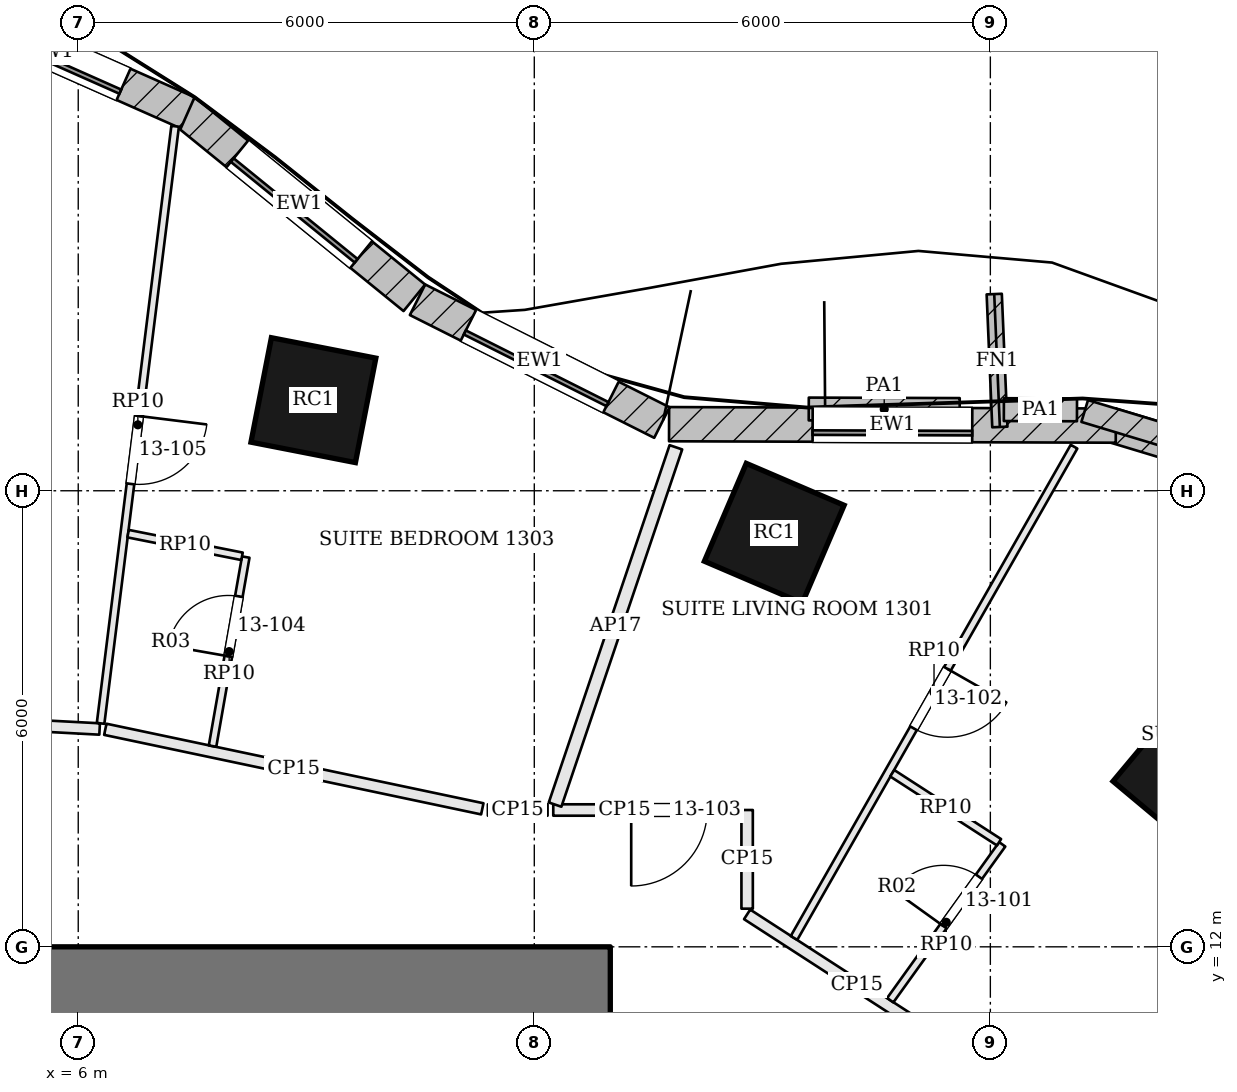
"""IFC4 building model, lengths in metres.
Left out: names, types, materials, properties, quantities, classifications, styles, units other than length and angle.
Written with IfcOpenShell. Run it as: python <this file> out.ifc"""

import sys

from ifc_helpers import new_model, si_unit, direction, frame, frame_2d, origin, origin_2d, place, context, subcontext, project, spatial, rectangle, extrude, element, fill, save


model = new_model("IFC4")
c1 = context("Model", 3, precision=1e-05, world=origin(), true_north=direction((0.0, 1.0)))
c2 = subcontext(c1, "Body", "Model", "MODEL_VIEW")
j1 = project(units=[si_unit("LENGTHUNIT", "METRE"), si_unit("PLANEANGLEUNIT", "RADIAN")], contexts=[c1])
p1 = place(None, origin())
s1 = spatial("IfcSite", under=j1, at=p1, CompositionType="ELEMENT")
p2 = place(p1, origin())
s2 = spatial("IfcBuilding", under=s1, at=p2, CompositionType="ELEMENT")
p3 = place(p2, frame((0.0, 0.0, 62.7)))
s3 = spatial("IfcBuildingStorey", under=s2, at=p3, CompositionType="ELEMENT", Elevation=62.7)
p4 = place(p3, frame((-13.0, 11.3, 0.0), z_axis=(0.0, 0.0, 1.0), x_axis=(1.0, 0.0, 0.0)))
e1 = element("IfcWall", 1, at=p4, inside=s3, PredefinedType="SHEAR", context=c2, shape_type="SweptSolid", body=[
    extrude(rectangle(XDim=26.0, YDim=1.4, at=frame_2d((13.0, 0.0))), origin(), (0.0, 0.0, 1.0), 3.6),
])
p5 = place(p4, frame((9.225, 0.0, 0.0)))
e2 = element("IfcOpeningElement", 2, at=p5, cuts=e1, PredefinedType="OPENING", context=c2, shape_type="SweptSolid", body=[
    extrude(rectangle(XDim=1.0, YDim=2.1, at=frame_2d((0.5, 1.05))), frame((0.0, 0.71, 0.0), z_axis=(0.0, -1.0, 0.0), x_axis=(1.0, 0.0, 0.0)), (0.0, 0.0, 1.0), 1.42),
])
p6 = place(p4, frame((12.225, 0.0, 0.0)))
e3 = element("IfcOpeningElement", 3, at=p6, cuts=e1, PredefinedType="OPENING", context=c2, shape_type="SweptSolid", body=[
    extrude(rectangle(XDim=0.7, YDim=2.1, at=frame_2d((0.35, 1.05))), frame((0.0, 0.71, 0.0), z_axis=(0.0, -1.0, 0.0), x_axis=(1.0, 0.0, 0.0)), (0.0, 0.0, 1.0), 1.42),
])
p7 = place(p4, frame((14.125, 0.0, 0.0)))
e4 = element("IfcOpeningElement", 4, at=p7, cuts=e1, PredefinedType="OPENING", context=c2, shape_type="SweptSolid", body=[
    extrude(rectangle(XDim=1.0, YDim=2.1, at=frame_2d((0.5, 1.05))), frame((0.0, 0.71, 0.0), z_axis=(0.0, -1.0, 0.0), x_axis=(1.0, 0.0, 0.0)), (0.0, 0.0, 1.0), 1.42),
])
p8 = place(p4, frame((15.65, 0.0, 0.0)))
e5 = element("IfcOpeningElement", 5, at=p8, cuts=e1, PredefinedType="OPENING", context=c2, shape_type="SweptSolid", body=[
    extrude(rectangle(XDim=1.0, YDim=2.1, at=frame_2d((0.5, 1.05))), frame((0.0, 0.71, 0.0), z_axis=(0.0, -1.0, 0.0), x_axis=(1.0, 0.0, 0.0)), (0.0, 0.0, 1.0), 1.42),
])
for number, where, z_axis, x_axis in (
    (6, (20.6, 14.266, 0.0), (0.0, 0.0, 1.0), (-0.767, 0.641, 0.0)),
    (7, (15.157, 17.441, 0.0), (0.0, 0.0, 1.0), (-0.919, 0.394, 0.0)),
    (8, (9.094, 19.192, 0.0), (0.0, 0.0, 1.0), (-0.981, 0.192, 0.0)),
):
    element("IfcColumn", number, at=place(p3, frame(where, z_axis=z_axis, x_axis=x_axis)), inside=s3, PredefinedType="COLUMN", context=c2, shape_type="SweptSolid", body=[
        extrude(rectangle(XDim=1.4, YDim=1.4, at=origin_2d()), origin(), (0.0, 0.0, 1.0), 3.6),
    ])
p9 = place(p3, frame((24.257, 17.456, 0.0), z_axis=(0.0, 0.0, 1.0), x_axis=(-0.957268138294, 0.289201852359, 0.0)))
e9 = element("IfcWall", 9, at=p9, inside=s3, PredefinedType="SOLIDWALL", context=c2, shape_type="SweptSolid", body=[
    extrude(rectangle(XDim=4.879, YDim=0.45, at=frame_2d((2.44, 0.0))), origin(), (0.0, 0.0, 1.0), 3.4),
])
p10 = place(p9, frame((1.39, 0.0, 0.9)))
e10 = element("IfcOpeningElement", 10, at=p10, cuts=e9, PredefinedType="OPENING", context=c2, shape_type="SweptSolid", body=[
    extrude(rectangle(XDim=2.1, YDim=2.0, at=frame_2d((1.05, 1.0))), frame((0.0, 0.235, 0.0), z_axis=(0.0, -1.0, 0.0), x_axis=(1.0, 0.0, 0.0)), (0.0, 0.0, 1.0), 0.47),
])
p11 = place(p3, frame((19.65, 18.857, 0.0), z_axis=(0.0, 0.0, 1.0), x_axis=(-0.999994750773, 0.003240127552, 0.0)))
e11 = element("IfcWall", 11, at=p11, inside=s3, PredefinedType="SOLIDWALL", context=c2, shape_type="SweptSolid", body=[
    extrude(rectangle(XDim=5.877, YDim=0.45, at=frame_2d((2.938, 0.0))), origin(), (0.0, 0.0, 1.0), 3.4),
])
p12 = place(p11, frame((1.889, 0.0, 0.9)))
e12 = element("IfcOpeningElement", 12, at=p12, cuts=e11, PredefinedType="OPENING", context=c2, shape_type="SweptSolid", body=[
    extrude(rectangle(XDim=2.1, YDim=2.0, at=frame_2d((1.05, 1.0))), frame((0.0, 0.235, 0.0), z_axis=(0.0, -1.0, 0.0), x_axis=(1.0, 0.0, 0.0)), (0.0, 0.0, 1.0), 0.47),
])
p13 = place(p3, frame((13.679, 18.897, 0.0), z_axis=(0.0, 0.0, 1.0), x_axis=(-0.893502471356, 0.449058274259, 0.0)))
e13 = element("IfcWall", 13, at=p13, inside=s3, PredefinedType="SOLIDWALL", context=c2, shape_type="SweptSolid", body=[
    extrude(rectangle(XDim=3.598, YDim=0.45, at=frame_2d((1.799, 0.0))), origin(), (0.0, 0.0, 1.0), 3.4),
])
p14 = place(p13, frame((0.749, 0.0, 0.9)))
e14 = element("IfcOpeningElement", 14, at=p14, cuts=e13, PredefinedType="OPENING", context=c2, shape_type="SweptSolid", body=[
    extrude(rectangle(XDim=2.1, YDim=2.0, at=frame_2d((1.05, 1.0))), frame((0.0, 0.235, 0.0), z_axis=(0.0, -1.0, 0.0), x_axis=(1.0, 0.0, 0.0)), (0.0, 0.0, 1.0), 0.47),
])
p15 = place(p3, frame((10.422, 20.539, 0.0), z_axis=(0.0, 0.0, 1.0), x_axis=(-0.775999170522, 0.63073392754, 0.0)))
e15 = element("IfcWall", 15, at=p15, inside=s3, PredefinedType="SOLIDWALL", context=c2, shape_type="SweptSolid", body=[
    extrude(rectangle(XDim=3.903, YDim=0.45, at=frame_2d((1.951, 0.0))), origin(), (0.0, 0.0, 1.0), 3.4),
])
p16 = place(p15, frame((0.901, 0.0, 0.9)))
e16 = element("IfcOpeningElement", 16, at=p16, cuts=e15, PredefinedType="OPENING", context=c2, shape_type="SweptSolid", body=[
    extrude(rectangle(XDim=2.1, YDim=2.0, at=frame_2d((1.05, 1.0))), frame((0.0, 0.235, 0.0), z_axis=(0.0, -1.0, 0.0), x_axis=(1.0, 0.0, 0.0)), (0.0, 0.0, 1.0), 0.47),
])
p17 = place(p3, frame((7.44, 22.972, 0.0), z_axis=(0.0, 0.0, 1.0), x_axis=(-0.914114918534, 0.405455195692, 0.0)))
e17 = element("IfcWall", 17, at=p17, inside=s3, PredefinedType="SOLIDWALL", context=c2, shape_type="SweptSolid", body=[
    extrude(rectangle(XDim=3.946, YDim=0.45, at=frame_2d((1.973, 0.0))), origin(), (0.0, 0.0, 1.0), 3.4),
])
p18 = place(p17, frame((0.923, 0.0, 0.9)))
e18 = element("IfcOpeningElement", 18, at=p18, cuts=e17, PredefinedType="OPENING", context=c2, shape_type="SweptSolid", body=[
    extrude(rectangle(XDim=2.1, YDim=2.0, at=frame_2d((1.05, 1.0))), frame((0.0, 0.235, 0.0), z_axis=(0.0, -1.0, 0.0), x_axis=(1.0, 0.0, 0.0)), (0.0, 0.0, 1.0), 0.47),
])
p19 = place(p3, frame((18.125, 18.839, 0.0), z_axis=(0.0, 0.0, 1.0), x_axis=(-0.042274699855, 0.999106025281, 0.0)))
e19 = element("IfcWall", 19, at=p19, inside=s3, PredefinedType="SOLIDWALL", context=c2, shape_type="SweptSolid", body=[
    extrude(rectangle(XDim=1.75, YDim=0.2, at=frame_2d((0.875, 0.0))), origin(), (0.0, 0.0, 1.0), 3.4),
])
p20 = place(p3, frame((24.128, 17.573, 3.6), z_axis=(0.0, 0.0, 1.0), x_axis=(-0.95727702005, 0.289172451806, 0.0)))
e20 = element("IfcWall", 20, at=p20, inside=s3, PredefinedType="PARAPET", context=c2, shape_type="SweptSolid", body=[
    extrude(rectangle(XDim=5.105, YDim=0.3, at=frame_2d((2.553, 0.0))), origin(), (0.0, 0.0, 1.0), 1.1),
])
p21 = place(p3, frame((19.14, 19.064, 3.6), z_axis=(0.0, 0.0, 1.0), x_axis=(-0.999994556719, 0.003299474426, 0.0)))
e21 = element("IfcWall", 21, at=p21, inside=s3, PredefinedType="PARAPET", context=c2, shape_type="SweptSolid", body=[
    extrude(rectangle(XDim=0.962, YDim=0.3, at=frame_2d((0.481, 0.0))), origin(), (0.0, 0.0, 1.0), 1.1),
])
p22 = place(p3, frame((17.596, 19.069, 3.6), z_axis=(0.0, 0.0, 1.0), x_axis=(-0.999994488127, 0.003320198128, 0.0)))
e22 = element("IfcWall", 22, at=p22, inside=s3, PredefinedType="PARAPET", context=c2, shape_type="SweptSolid", body=[
    extrude(rectangle(XDim=1.985, YDim=0.3, at=frame_2d((0.993, 0.0))), origin(), (0.0, 0.0, 1.0), 1.1),
])
p23 = place(p3, frame((17.691, 10.556, 0.0), z_axis=(0.0, 0.0, 1.0), x_axis=(-0.839564450265, 0.54326009779, 0.0)))
e23 = element("IfcWall", 23, at=p23, inside=s3, PredefinedType="PARTITIONING", context=c2, shape_type="SweptSolid", body=[
    extrude(rectangle(XDim=3.443, YDim=0.15, at=frame_2d((1.722, 0.0))), origin(), (0.0, 0.0, 1.0), 2.68),
])
p24 = place(p3, frame((14.8, 12.502, 0.0), z_axis=(0.0, 0.0, 1.0), x_axis=(-0.000188040613, 0.99999998232, 0.0)))
e24 = element("IfcWall", 24, at=p24, inside=s3, PredefinedType="PARTITIONING", context=c2, shape_type="SweptSolid", body=[
    extrude(rectangle(XDim=1.298, YDim=0.15, at=frame_2d((0.649, 0.0))), origin(), (0.0, 0.0, 1.0), 2.68),
])
p25 = place(p3, frame((14.725, 13.8, 0.0), z_axis=(0.0, 0.0, 1.0), x_axis=(-1.0, 0.0, 0.0)))
e25 = element("IfcWall", 25, at=p25, inside=s3, PredefinedType="PARTITIONING", context=c2, shape_type="SweptSolid", body=[
    extrude(rectangle(XDim=2.476, YDim=0.15, at=frame_2d((1.238, 0.0))), origin(), (0.0, 0.0, 1.0), 2.68),
])
p26 = place(p25, frame((0.45, 0.0, 0.0)))
e26 = element("IfcOpeningElement", 26, at=p26, cuts=e25, PredefinedType="OPENING", context=c2, shape_type="SweptSolid", body=[
    extrude(rectangle(XDim=1.0, YDim=2.1, at=frame_2d((0.5, 1.05))), frame((0.0, 0.085, 0.0), z_axis=(0.0, -1.0, 0.0), x_axis=(1.0, 0.0, 0.0)), (0.0, 0.0, 1.0), 0.17),
])
p27 = place(p3, frame((26.021, 13.398, 0.0), z_axis=(0.0, 0.0, 1.0), x_axis=(-0.791914254245, -0.610632306649, 0.0)))
e27 = element("IfcWall", 27, at=p27, inside=s3, PredefinedType="PARTITIONING", context=c2, shape_type="SweptSolid", body=[
    extrude(rectangle(XDim=7.922, YDim=0.175, at=frame_2d((3.961, 0.0))), origin(), (0.0, 0.0, 1.0), 2.68),
])
p28 = place(p3, frame((13.863, 18.572, 0.0), z_axis=(0.0, 0.0, 1.0), x_axis=(-0.320254541028, -0.947331530643, 0.0)))
e28 = element("IfcWall", 28, at=p28, inside=s3, PredefinedType="PARTITIONING", context=c2, shape_type="SweptSolid", body=[
    extrude(rectangle(XDim=4.962, YDim=0.175, at=frame_2d((2.481, 0.0))), origin(), (0.0, 0.0, 1.0), 2.68),
])
p29 = place(p3, frame((12.175, 13.8, 0.0), z_axis=(0.0, 0.0, 1.0), x_axis=(-1.0, 0.0, 0.0)))
e29 = element("IfcWall", 29, at=p29, inside=s3, PredefinedType="PARTITIONING", context=c2, shape_type="SweptSolid", body=[
    extrude(rectangle(XDim=0.785, YDim=0.15, at=frame_2d((0.393, 0.0))), origin(), (0.0, 0.0, 1.0), 2.68),
])
p30 = place(p3, frame((11.316, 13.815, 0.0), z_axis=(0.0, 0.0, 1.0), x_axis=(-0.978460774853, 0.206432827025, 0.0)))
e30 = element("IfcWall", 30, at=p30, inside=s3, PredefinedType="PARTITIONING", context=c2, shape_type="SweptSolid", body=[
    extrude(rectangle(XDim=5.069, YDim=0.15, at=frame_2d((2.534, 0.0))), origin(), (0.0, 0.0, 1.0), 2.68),
])
p31 = place(p3, frame((6.281, 14.866, 0.0), z_axis=(0.0, 0.0, 1.0), x_axis=(-0.998587832803, 0.053125701673, 0.0)))
e31 = element("IfcWall", 31, at=p31, inside=s3, PredefinedType="PARTITIONING", context=c2, shape_type="SweptSolid", body=[
    extrude(rectangle(XDim=6.126, YDim=0.15, at=frame_2d((3.063, 0.0))), origin(), (0.0, 0.0, 1.0), 2.68),
])
p32 = place(p31, frame((2.561, 0.0, 0.0)))
e32 = element("IfcOpeningElement", 32, at=p32, cuts=e31, PredefinedType="OPENING", context=c2, shape_type="SweptSolid", body=[
    extrude(rectangle(XDim=1.0, YDim=2.1, at=frame_2d((0.5, 1.05))), frame((0.0, 0.085, 0.0), z_axis=(0.0, -1.0, 0.0), x_axis=(1.0, 0.0, 0.0)), (0.0, 0.0, 1.0), 0.17),
])
p33 = place(p3, frame((19.101, 18.58, 0.0), z_axis=(0.0, 0.0, 1.0), x_axis=(-0.49517728181, -0.868791954141, 0.0)))
e33 = element("IfcWall", 33, at=p33, inside=s3, PredefinedType="PARTITIONING", context=c2, shape_type="SweptSolid", body=[
    extrude(rectangle(XDim=7.439, YDim=0.1, at=frame_2d((3.719, 0.0))), origin(), (0.0, 0.0, 1.0), 2.68),
])
p34 = place(p33, frame((3.364, 0.0, 0.0)))
e34 = element("IfcOpeningElement", 34, at=p34, cuts=e33, PredefinedType="OPENING", context=c2, shape_type="SweptSolid", body=[
    extrude(rectangle(XDim=0.9, YDim=2.4, at=frame_2d((0.45, 1.2))), frame((0.0, 0.06, 0.0), z_axis=(0.0, -1.0, 0.0), x_axis=(1.0, 0.0, 0.0)), (0.0, 0.0, 1.0), 0.12),
])
p35 = place(p3, frame((16.683, 11.298, 0.0), z_axis=(0.0, 0.0, 1.0), x_axis=(0.583412891342, 0.812175718805, 0.0)))
e35 = element("IfcWall", 35, at=p35, inside=s3, PredefinedType="PARTITIONING", context=c2, shape_type="SweptSolid", body=[
    extrude(rectangle(XDim=2.525, YDim=0.1, at=frame_2d((1.263, 0.0))), origin(), (0.0, 0.0, 1.0), 2.68),
])
p36 = place(p35, frame((1.2, 0.0, 0.0)))
e36 = element("IfcOpeningElement", 36, at=p36, cuts=e35, PredefinedType="OPENING", context=c2, shape_type="SweptSolid", body=[
    extrude(rectangle(XDim=0.8, YDim=2.1, at=frame_2d((0.4, 1.05))), frame((0.0, 0.06, 0.0), z_axis=(0.0, -1.0, 0.0), x_axis=(1.0, 0.0, 0.0)), (0.0, 0.0, 1.0), 0.12),
])
p37 = place(p3, frame((18.114, 13.375, 0.0), z_axis=(0.0, 0.0, 1.0), x_axis=(-0.839848081289, 0.542821517955, 0.0)))
e37 = element("IfcWall", 37, at=p37, inside=s3, PredefinedType="PARTITIONING", context=c2, shape_type="SweptSolid", body=[
    extrude(rectangle(XDim=1.673, YDim=0.1, at=frame_2d((0.836, 0.0))), origin(), (0.0, 0.0, 1.0), 2.68),
])
p38 = place(p3, frame((7.275, 22.795, 0.0), z_axis=(0.0, 0.0, 1.0), x_axis=(-0.123890489741, -0.992295896672, 0.0)))
e38 = element("IfcWall", 38, at=p38, inside=s3, PredefinedType="PARTITIONING", context=c2, shape_type="SweptSolid", body=[
    extrude(rectangle(XDim=7.916, YDim=0.1, at=frame_2d((3.958, 0.0))), origin(), (0.0, 0.0, 1.0), 2.68),
])
p39 = place(p38, frame((3.841, 0.0, 0.0)))
e39 = element("IfcOpeningElement", 39, at=p39, cuts=e38, PredefinedType="OPENING", context=c2, shape_type="SweptSolid", body=[
    extrude(rectangle(XDim=0.9, YDim=2.4, at=frame_2d((0.45, 1.2))), frame((0.0, 0.06, 0.0), z_axis=(0.0, -1.0, 0.0), x_axis=(1.0, 0.0, 0.0)), (0.0, 0.0, 1.0), 0.12),
])
p40 = place(p3, frame((7.767, 14.641, 0.0), z_axis=(0.0, 0.0, 1.0), x_axis=(0.172985442563, 0.984924381189, 0.0)))
e40 = element("IfcWall", 40, at=p40, inside=s3, PredefinedType="PARTITIONING", context=c2, shape_type="SweptSolid", body=[
    extrude(rectangle(XDim=2.525, YDim=0.1, at=frame_2d((1.262, 0.0))), origin(), (0.0, 0.0, 1.0), 2.68),
])
p41 = place(p40, frame((1.2, 0.0, 0.0)))
e41 = element("IfcOpeningElement", 41, at=p41, cuts=e40, PredefinedType="OPENING", context=c2, shape_type="SweptSolid", body=[
    extrude(rectangle(XDim=0.8, YDim=2.1, at=frame_2d((0.4, 1.05))), frame((0.0, 0.06, 0.0), z_axis=(0.0, -1.0, 0.0), x_axis=(1.0, 0.0, 0.0)), (0.0, 0.0, 1.0), 0.12),
])
p42 = place(p3, frame((8.155, 17.137, 0.0), z_axis=(0.0, 0.0, 1.0), x_axis=(-0.980758463285, 0.195225092382, 0.0)))
e42 = element("IfcWall", 42, at=p42, inside=s3, PredefinedType="PARTITIONING", context=c2, shape_type="SweptSolid", body=[
    extrude(rectangle(XDim=1.528, YDim=0.1, at=frame_2d((0.764, 0.0))), origin(), (0.0, 0.0, 1.0), 2.68),
])
p43 = place(p12, origin())
e43 = element("IfcWindow", 43, at=p43, inside=s3, PartitioningType="SINGLE_PANEL", PredefinedType="WINDOW", context=c2, shape_type="SweptSolid", body=[
    extrude(rectangle(XDim=2.1, YDim=2.0, at=frame_2d((1.05, 1.0))), frame((0.0, 0.135, 0.0), z_axis=(0.0, -1.0, 0.0), x_axis=(1.0, 0.0, 0.0)), (0.0, 0.0, 1.0), 0.06),
])
fill(e12, e43)
p44 = place(p14, origin())
e44 = element("IfcWindow", 44, at=p44, inside=s3, PartitioningType="SINGLE_PANEL", PredefinedType="WINDOW", context=c2, shape_type="SweptSolid", body=[
    extrude(rectangle(XDim=2.1, YDim=2.0, at=frame_2d((1.05, 1.0))), frame((0.0, 0.135, 0.0), z_axis=(0.0, -1.0, 0.0), x_axis=(1.0, 0.0, 0.0)), (0.0, 0.0, 1.0), 0.06),
])
fill(e14, e44)
p45 = place(p16, origin())
e45 = element("IfcWindow", 45, at=p45, inside=s3, PartitioningType="SINGLE_PANEL", PredefinedType="WINDOW", context=c2, shape_type="SweptSolid", body=[
    extrude(rectangle(XDim=2.1, YDim=2.0, at=frame_2d((1.05, 1.0))), frame((0.0, 0.135, 0.0), z_axis=(0.0, -1.0, 0.0), x_axis=(1.0, 0.0, 0.0)), (0.0, 0.0, 1.0), 0.06),
])
fill(e16, e45)
p46 = place(p18, origin())
e46 = element("IfcWindow", 46, at=p46, inside=s3, PartitioningType="SINGLE_PANEL", PredefinedType="WINDOW", context=c2, shape_type="SweptSolid", body=[
    extrude(rectangle(XDim=2.1, YDim=2.0, at=frame_2d((1.05, 1.0))), frame((0.0, 0.135, 0.0), z_axis=(0.0, -1.0, 0.0), x_axis=(1.0, 0.0, 0.0)), (0.0, 0.0, 1.0), 0.06),
])
fill(e18, e46)
p47 = place(p36, origin())
e47 = element("IfcDoor", 47, at=p47, inside=s3, OperationType="SINGLE_SWING_LEFT", PredefinedType="DOOR", context=c2, shape_type="SweptSolid", body=[
    extrude(rectangle(XDim=0.8, YDim=2.1, at=frame_2d((0.4, 1.05))), frame((0.0, 0.025, 0.0), z_axis=(0.0, -1.0, 0.0), x_axis=(1.0, 0.0, 0.0)), (0.0, 0.0, 1.0), 0.05),
])
fill(e36, e47)
p48 = place(p34, origin())
e48 = element("IfcDoor", 48, at=p48, inside=s3, OperationType="SINGLE_SWING_LEFT", PredefinedType="DOOR", context=c2, shape_type="SweptSolid", body=[
    extrude(rectangle(XDim=0.9, YDim=2.4, at=frame_2d((0.45, 1.2))), frame((0.0, 0.025, 0.0), z_axis=(0.0, -1.0, 0.0), x_axis=(1.0, 0.0, 0.0)), (0.0, 0.0, 1.0), 0.05),
])
fill(e34, e48)
p49 = place(p26, origin())
e49 = element("IfcDoor", 49, at=p49, inside=s3, OperationType="SINGLE_SWING_RIGHT", PredefinedType="DOOR", context=c2, shape_type="SweptSolid", body=[
    extrude(rectangle(XDim=1.0, YDim=2.1, at=frame_2d((0.5, 1.05))), frame((0.0, 0.025, 0.0), z_axis=(0.0, -1.0, 0.0), x_axis=(1.0, 0.0, 0.0)), (0.0, 0.0, 1.0), 0.05),
])
fill(e26, e49)
p50 = place(p41, origin())
e50 = element("IfcDoor", 50, at=p50, inside=s3, OperationType="SINGLE_SWING_LEFT", PredefinedType="DOOR", context=c2, shape_type="SweptSolid", body=[
    extrude(rectangle(XDim=0.8, YDim=2.1, at=frame_2d((0.4, 1.05))), frame((0.0, 0.025, 0.0), z_axis=(0.0, -1.0, 0.0), x_axis=(1.0, 0.0, 0.0)), (0.0, 0.0, 1.0), 0.05),
])
fill(e41, e50)
p51 = place(p39, origin())
e51 = element("IfcDoor", 51, at=p51, inside=s3, OperationType="SINGLE_SWING_LEFT", PredefinedType="DOOR", context=c2, shape_type="SweptSolid", body=[
    extrude(rectangle(XDim=0.9, YDim=2.4, at=frame_2d((0.45, 1.2))), frame((0.0, 0.025, 0.0), z_axis=(0.0, -1.0, 0.0), x_axis=(1.0, 0.0, 0.0)), (0.0, 0.0, 1.0), 0.05),
])
fill(e39, e51)
save(model, sys.argv[1])
